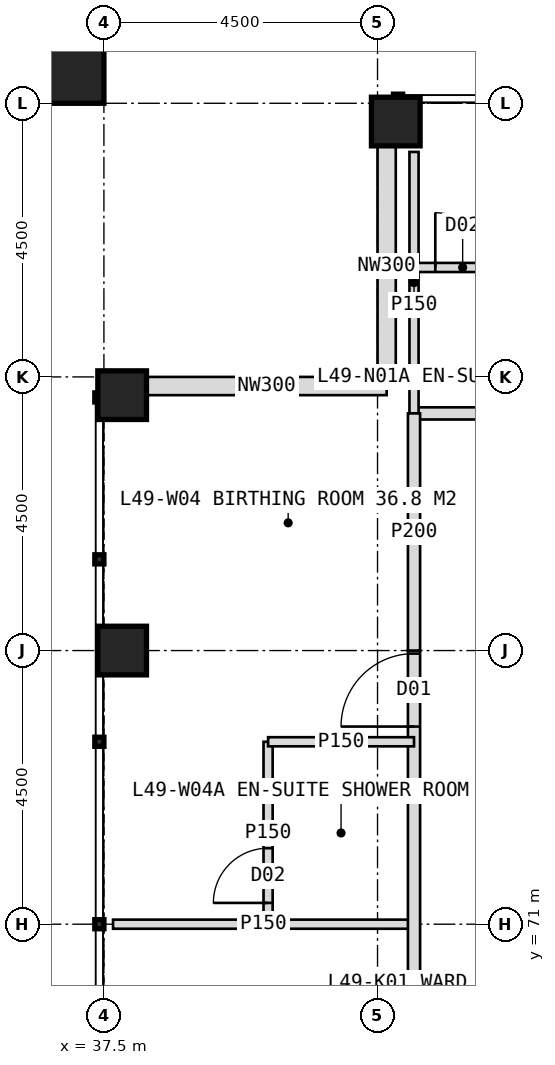
"""IFC4 building model, lengths in metres.
Left out: names, types, materials, properties, quantities, classifications, styles, units other than length and angle.
Written with IfcOpenShell. Run it as: python <this file> out.ifc"""

import sys

from ifc_helpers import new_model, si_unit, direction, frame, frame_2d, origin, origin_2d, place, context, subcontext, project, spatial, rectangle, hollow_rectangle, extrude, element, fill, save


model = new_model("IFC4")
c1 = context("Model", 3, precision=1e-05, world=origin(), true_north=direction((0.0, 1.0)))
c2 = subcontext(c1, "Body", "Model", "MODEL_VIEW")
j1 = project(units=[si_unit("LENGTHUNIT", "METRE"), si_unit("PLANEANGLEUNIT", "RADIAN")], contexts=[c1])
p1 = place(None, origin())
s1 = spatial("IfcSite", under=j1, at=p1, CompositionType="ELEMENT")
p2 = place(p1, origin())
s2 = spatial("IfcBuilding", under=s1, at=p2, CompositionType="ELEMENT")
p3 = place(p2, frame((0.0, 0.0, 205.0)))
s3 = spatial("IfcBuildingStorey", under=s2, at=p3, CompositionType="ELEMENT", Elevation=205.0)
for number, where, z_axis, x_axis in (
    (1, (42.3, 84.2, 0.0), (0.0, 0.0, 1.0), (1.0, 0.0, 0.0)),
    (2, (37.8, 75.5, 0.0), (0.0, 0.0, 1.0), (1.0, 0.0, 0.0)),
    (3, (37.8, 79.7, 0.0), (0.0, 0.0, 1.0), (1.0, 0.0, 0.0)),
):
    element("IfcColumn", number, at=place(p3, frame(where, z_axis=z_axis, x_axis=x_axis)), inside=s3, PredefinedType="COLUMN", context=c2, shape_type="SweptSolid", body=[
        extrude(hollow_rectangle(XDim=0.8, YDim=0.8, WallThickness=0.08, at=origin_2d()), origin(), (0.0, 0.0, 1.0), 4.0),
    ])
p4 = place(p3, frame((36.9, 85.1, 0.0), z_axis=(0.0, 0.0, 1.0), x_axis=(1.0, 0.0, 0.0)))
e4 = element("IfcColumn", 4, at=p4, inside=s3, PredefinedType="COLUMN", context=c2, shape_type="SweptSolid", body=[
    extrude(hollow_rectangle(XDim=1.2, YDim=1.2, WallThickness=0.07, at=origin_2d()), origin(), (0.0, 0.0, 1.0), 4.0),
])
for number, where, z_axis, x_axis in (
    (5, (38.2, 79.85, 0.0), (0.0, 0.0, 1.0), (1.0, 0.0, 0.0)),
    (6, (42.15, 79.85, 0.0), (0.0, 0.0, 1.0), (0.0, 1.0, 0.0)),
):
    element("IfcWall", number, at=place(p3, frame(where, z_axis=z_axis, x_axis=x_axis)), inside=s3, PredefinedType="ELEMENTEDWALL", context=c2, shape_type="SweptSolid", body=[
        extrude(rectangle(XDim=3.95, YDim=0.3, at=frame_2d((1.975, 0.0))), origin(), (0.0, 0.0, 1.0), 2.85),
    ])
p5 = place(p3, frame((42.6, 79.4, 0.0), z_axis=(0.0, 0.0, 1.0), x_axis=(1.0, 0.0, 0.0)))
e7 = element("IfcWall", 7, at=p5, inside=s3, PredefinedType="PARTITIONING", context=c2, shape_type="SweptSolid", body=[
    extrude(rectangle(XDim=4.45, YDim=0.2, at=frame_2d((2.225, 0.0))), origin(), (0.0, 0.0, 1.0), 2.85),
])
p6 = place(p5, frame((3.25, 0.0, 0.0)))
e8 = element("IfcOpeningElement", 8, at=p6, cuts=e7, PredefinedType="OPENING", context=c2, shape_type="SweptSolid", body=[
    extrude(rectangle(XDim=1.2, YDim=2.2, at=frame_2d((0.6, 1.1))), frame((0.0, 0.11, 0.0), z_axis=(0.0, -1.0, 0.0), x_axis=(1.0, 0.0, 0.0)), (0.0, 0.0, 1.0), 0.22),
])
p7 = place(p3, frame((42.6, 79.4, 0.0), z_axis=(0.0, 0.0, 1.0), x_axis=(0.0, 1.0, 0.0)))
e9 = element("IfcWall", 9, at=p7, inside=s3, PredefinedType="PARTITIONING", context=c2, shape_type="SweptSolid", body=[
    extrude(rectangle(XDim=4.3, YDim=0.15, at=frame_2d((2.15, 0.0))), origin(), (0.0, 0.0, 1.0), 2.85),
])
p8 = place(p3, frame((42.6, 81.8, 0.0), z_axis=(0.0, 0.0, 1.0), x_axis=(1.0, 0.0, 0.0)))
e10 = element("IfcWall", 10, at=p8, inside=s3, PredefinedType="PARTITIONING", context=c2, shape_type="SweptSolid", body=[
    extrude(rectangle(XDim=3.0, YDim=0.15, at=frame_2d((1.5, 0.0))), origin(), (0.0, 0.0, 1.0), 3.75),
])
p9 = place(p8, frame((0.35, 0.0, 0.0)))
e11 = element("IfcOpeningElement", 11, at=p9, cuts=e10, PredefinedType="OPENING", context=c2, shape_type="SweptSolid", body=[
    extrude(rectangle(XDim=0.9, YDim=2.1, at=frame_2d((0.45, 1.05))), frame((0.0, 0.085, 0.0), z_axis=(0.0, -1.0, 0.0), x_axis=(1.0, 0.0, 0.0)), (0.0, 0.0, 1.0), 0.17),
])
p10 = place(p3, frame((42.6, 71.0, 0.0), z_axis=(0.0, 0.0, 1.0), x_axis=(-1.0, 0.0, 0.0)))
e12 = element("IfcWall", 12, at=p10, inside=s3, PredefinedType="PARTITIONING", context=c2, shape_type="SweptSolid", body=[
    extrude(rectangle(XDim=4.95, YDim=0.15, at=frame_2d((2.475, 0.0))), origin(), (0.0, 0.0, 1.0), 3.75),
])
p11 = place(p3, frame((42.6, 49.05, 0.0), z_axis=(0.0, 0.0, 1.0), x_axis=(0.0, 1.0, 0.0)))
e13 = element("IfcWall", 13, at=p11, inside=s3, PredefinedType="PARTITIONING", context=c2, shape_type="SweptSolid", body=[
    extrude(rectangle(XDim=26.45, YDim=0.2, at=frame_2d((13.225, 0.0))), origin(), (0.0, 0.0, 1.0), 3.75),
])
p12 = place(p11, frame((7.2, 0.0, 0.0)))
e14 = element("IfcOpeningElement", 14, at=p12, cuts=e13, PredefinedType="OPENING", context=c2, shape_type="SweptSolid", body=[
    extrude(rectangle(XDim=1.2, YDim=2.2, at=frame_2d((0.6, 1.1))), frame((0.0, 0.11, 0.0), z_axis=(0.0, -1.0, 0.0), x_axis=(1.0, 0.0, 0.0)), (0.0, 0.0, 1.0), 0.22),
])
p13 = place(p11, frame((16.2, 0.0, 0.0)))
e15 = element("IfcOpeningElement", 15, at=p13, cuts=e13, PredefinedType="OPENING", context=c2, shape_type="SweptSolid", body=[
    extrude(rectangle(XDim=1.2, YDim=2.2, at=frame_2d((0.6, 1.1))), frame((0.0, 0.11, 0.0), z_axis=(0.0, -1.0, 0.0), x_axis=(1.0, 0.0, 0.0)), (0.0, 0.0, 1.0), 0.22),
])
p14 = place(p11, frame((25.2, 0.0, 0.0)))
e16 = element("IfcOpeningElement", 16, at=p14, cuts=e13, PredefinedType="OPENING", context=c2, shape_type="SweptSolid", body=[
    extrude(rectangle(XDim=1.2, YDim=2.2, at=frame_2d((0.6, 1.1))), frame((0.0, 0.11, 0.0), z_axis=(0.0, -1.0, 0.0), x_axis=(1.0, 0.0, 0.0)), (0.0, 0.0, 1.0), 0.22),
])
p15 = place(p3, frame((42.6, 75.5, 0.0), z_axis=(0.0, 0.0, 1.0), x_axis=(0.0, 1.0, 0.0)))
e17 = element("IfcWall", 17, at=p15, inside=s3, PredefinedType="PARTITIONING", context=c2, shape_type="SweptSolid", body=[
    extrude(rectangle(XDim=3.9, YDim=0.2, at=frame_2d((1.95, 0.0))), origin(), (0.0, 0.0, 1.0), 2.85),
])
p16 = place(p3, frame((40.2, 71.0, 0.0), z_axis=(0.0, 0.0, 1.0), x_axis=(0.0, 1.0, 0.0)))
e18 = element("IfcWall", 18, at=p16, inside=s3, PredefinedType="PARTITIONING", context=c2, shape_type="SweptSolid", body=[
    extrude(rectangle(XDim=3.0, YDim=0.15, at=frame_2d((1.5, 0.0))), origin(), (0.0, 0.0, 1.0), 3.75),
])
p17 = place(p16, frame((0.35, 0.0, 0.0)))
e19 = element("IfcOpeningElement", 19, at=p17, cuts=e18, PredefinedType="OPENING", context=c2, shape_type="SweptSolid", body=[
    extrude(rectangle(XDim=0.9, YDim=2.1, at=frame_2d((0.45, 1.05))), frame((0.0, 0.085, 0.0), z_axis=(0.0, -1.0, 0.0), x_axis=(1.0, 0.0, 0.0)), (0.0, 0.0, 1.0), 0.17),
])
p18 = place(p3, frame((42.6, 74.0, 0.0), z_axis=(0.0, 0.0, 1.0), x_axis=(-1.0, 0.0, 0.0)))
e20 = element("IfcWall", 20, at=p18, inside=s3, PredefinedType="PARTITIONING", context=c2, shape_type="SweptSolid", body=[
    extrude(rectangle(XDim=2.4, YDim=0.15, at=frame_2d((1.2, 0.0))), origin(), (0.0, 0.0, 1.0), 3.75),
])
p19 = place(p9, origin())
e21 = element("IfcDoor", 21, at=p19, inside=s3, OperationType="SINGLE_SWING_LEFT", PredefinedType="DOOR", context=c2, shape_type="SweptSolid", body=[
    extrude(rectangle(XDim=0.9, YDim=2.1, at=frame_2d((0.45, 1.05))), frame((0.0, 0.025, 0.0), z_axis=(0.0, -1.0, 0.0), x_axis=(1.0, 0.0, 0.0)), (0.0, 0.0, 1.0), 0.05),
])
fill(e11, e21)
p20 = place(p14, origin())
e22 = element("IfcDoor", 22, at=p20, inside=s3, OperationType="SINGLE_SWING_LEFT", PredefinedType="DOOR", context=c2, shape_type="SweptSolid", body=[
    extrude(rectangle(XDim=1.2, YDim=2.2, at=frame_2d((0.6, 1.1))), frame((0.0, 0.025, 0.0), z_axis=(0.0, -1.0, 0.0), x_axis=(1.0, 0.0, 0.0)), (0.0, 0.0, 1.0), 0.05),
])
fill(e16, e22)
p21 = place(p17, origin())
e23 = element("IfcDoor", 23, at=p21, inside=s3, OperationType="SINGLE_SWING_LEFT", PredefinedType="DOOR", context=c2, shape_type="SweptSolid", body=[
    extrude(rectangle(XDim=0.9, YDim=2.1, at=frame_2d((0.45, 1.05))), frame((0.0, 0.025, 0.0), z_axis=(0.0, -1.0, 0.0), x_axis=(1.0, 0.0, 0.0)), (0.0, 0.0, 1.0), 0.05),
])
fill(e19, e23)
save(model, sys.argv[1])
